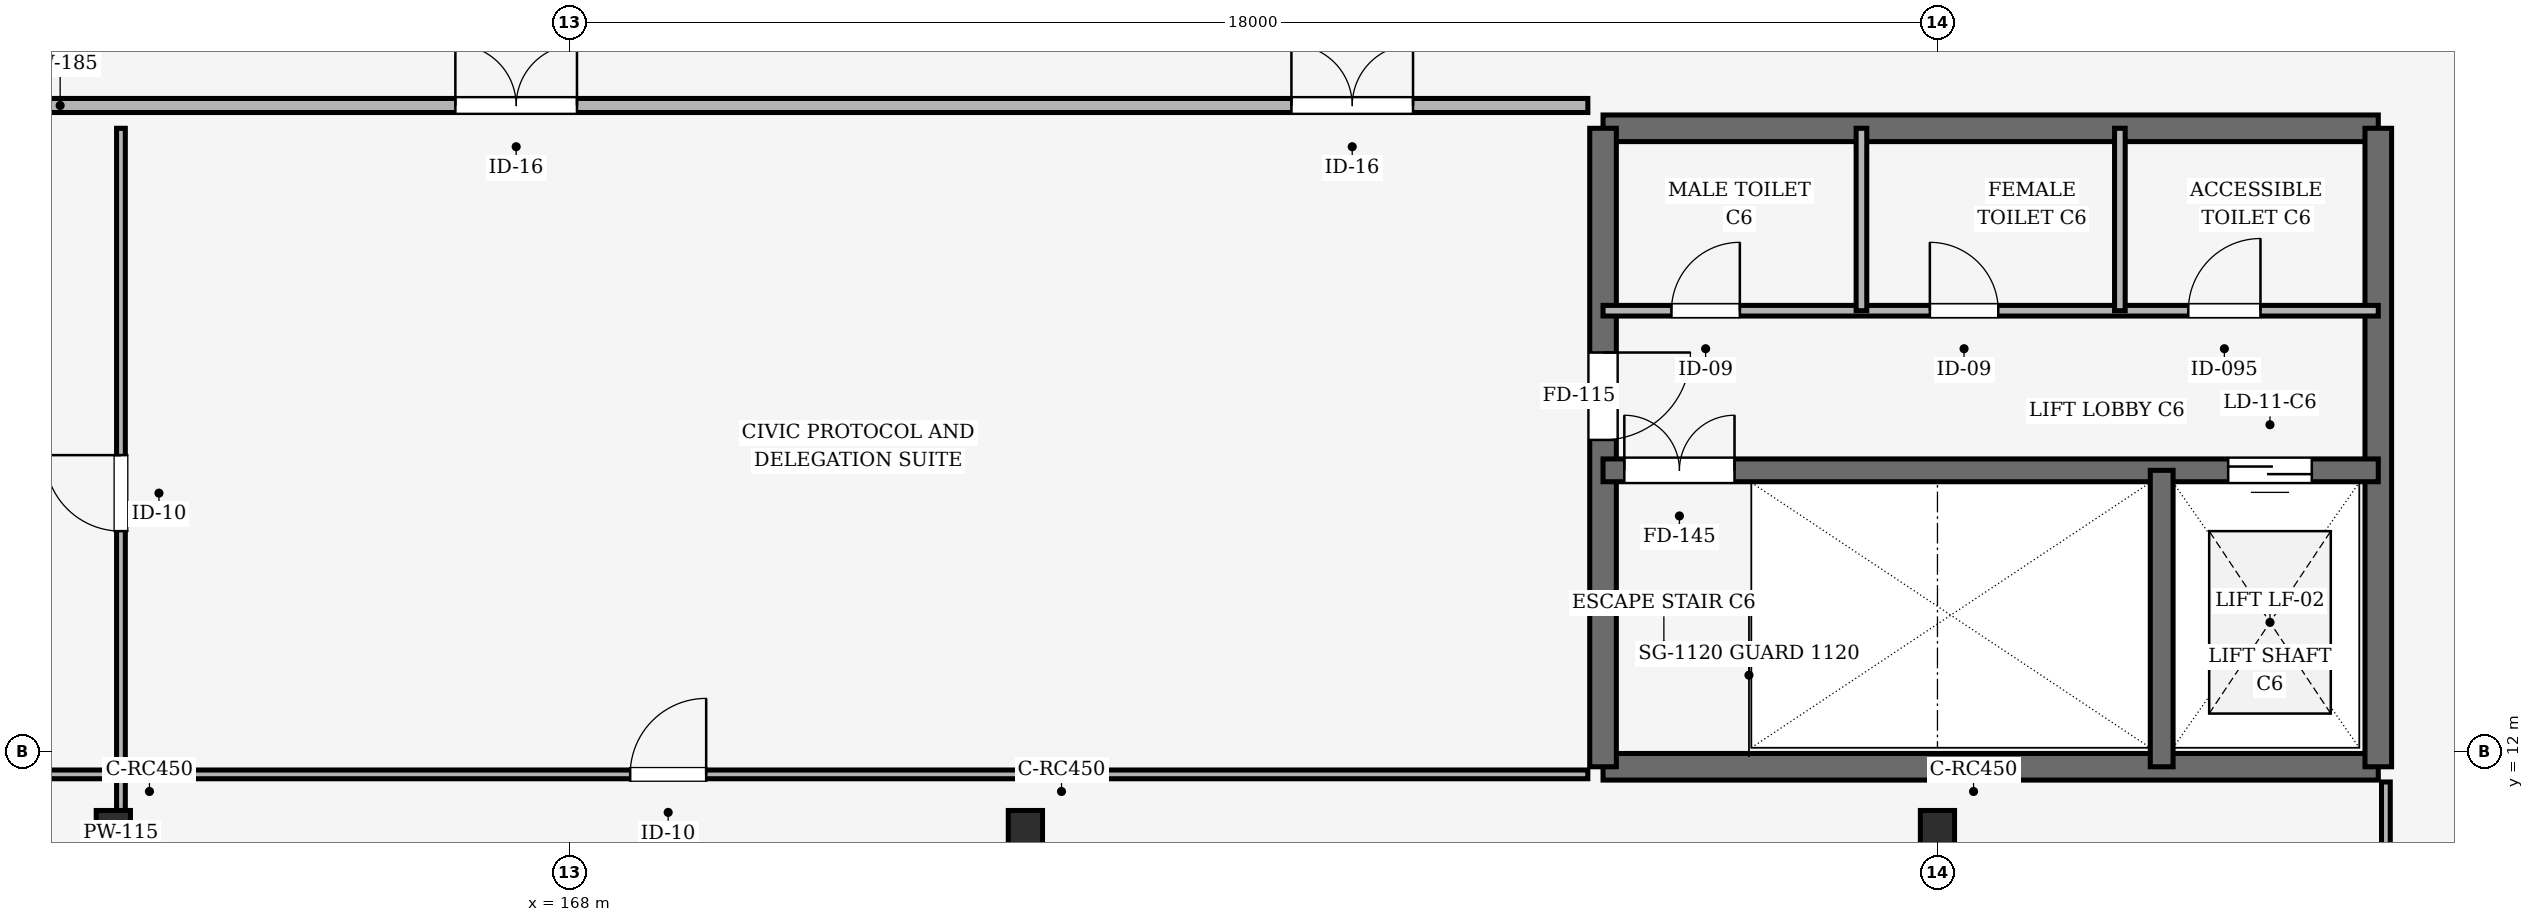
"""IFC4 building model, lengths in metres.
Left out: names, types, materials, properties, quantities, classifications, styles, units other than length and angle.
Written with IfcOpenShell. Run it as: python <this file> out.ifc"""

import sys

from ifc_helpers import new_model, si_unit, direction, frame, frame_2d, origin, origin_2d, place, context, subcontext, project, spatial, rectangle, extrude, element, fill, save


model = new_model("IFC4")
c1 = context("Model", 3, precision=1e-05, world=origin(), true_north=direction((0.0, 1.0)))
c2 = subcontext(c1, "Body", "Model", "MODEL_VIEW")
j1 = project(units=[si_unit("LENGTHUNIT", "METRE"), si_unit("PLANEANGLEUNIT", "RADIAN")], contexts=[c1])
p1 = place(None, origin())
s1 = spatial("IfcSite", under=j1, at=p1, CompositionType="ELEMENT")
p2 = place(p1, origin())
s2 = spatial("IfcBuilding", under=s1, at=p2, CompositionType="ELEMENT")
p3 = place(p2, frame((0.0, 0.0, 16.2)))
s3 = spatial("IfcBuildingStorey", under=s2, at=p3, CompositionType="ELEMENT", Elevation=16.2)
for number, where, z_axis, x_axis in (
    (1, (162.0, 11.0, 0.0), (0.0, 0.0, 1.0), (1.0, 0.0, 0.0)),
    (2, (174.0, 11.0, 0.0), (0.0, 0.0, 1.0), (1.0, 0.0, 0.0)),
    (3, (186.0, 11.0, 0.0), (0.0, 0.0, 1.0), (1.0, 0.0, 0.0)),
):
    element("IfcColumn", number, at=place(p3, frame(where, z_axis=z_axis, x_axis=x_axis)), inside=s3, PredefinedType="COLUMN", context=c2, shape_type="SweptSolid", body=[
        extrude(rectangle(XDim=0.45, YDim=0.45, at=origin_2d()), origin(), (0.0, 0.0, 1.0), 4.5),
    ])
for number, where, z_axis, x_axis in (
    (4, (181.6, 11.8, 0.0), (0.0, 0.0, 1.0), (1.0, 0.0, 0.0)),
    (5, (191.8, 20.2, 0.0), (0.0, 0.0, 1.0), (-1.0, 0.0, 0.0)),
):
    element("IfcWall", number, at=place(p3, frame(where, z_axis=z_axis, x_axis=x_axis)), inside=s3, PredefinedType="SHEAR", context=c2, shape_type="SweptSolid", body=[
        extrude(rectangle(XDim=10.2, YDim=0.35, at=frame_2d((5.1, 0.0))), origin(), (0.0, 0.0, 1.0), 4.5),
    ])
p4 = place(p3, frame((181.6, 20.2, 0.0), z_axis=(0.0, 0.0, 1.0), x_axis=(0.0, -1.0, 0.0)))
e6 = element("IfcWall", 6, at=p4, inside=s3, PredefinedType="SHEAR", context=c2, shape_type="SweptSolid", body=[
    extrude(rectangle(XDim=8.4, YDim=0.35, at=frame_2d((4.2, 0.0))), origin(), (0.0, 0.0, 1.0), 4.5),
])
p5 = place(p4, frame((2.95, 0.0, 0.0)))
e7 = element("IfcOpeningElement", 7, at=p5, cuts=e6, PredefinedType="OPENING", context=c2, shape_type="SweptSolid", body=[
    extrude(rectangle(XDim=1.15, YDim=2.15, at=frame_2d((0.575, 1.075))), frame((0.0, 0.185, 0.0), z_axis=(0.0, -1.0, 0.0), x_axis=(1.0, 0.0, 0.0)), (0.0, 0.0, 1.0), 0.37),
])
p6 = place(p3, frame((191.8, 11.8, 0.0), z_axis=(0.0, 0.0, 1.0), x_axis=(0.0, 1.0, 0.0)))
e8 = element("IfcWall", 8, at=p6, inside=s3, PredefinedType="SHEAR", context=c2, shape_type="SweptSolid", body=[
    extrude(rectangle(XDim=8.4, YDim=0.35, at=frame_2d((4.2, 0.0))), origin(), (0.0, 0.0, 1.0), 4.5),
])
p7 = place(p3, frame((181.6, 15.7, 0.0), z_axis=(0.0, 0.0, 1.0), x_axis=(1.0, 0.0, 0.0)))
e9 = element("IfcWall", 9, at=p7, inside=s3, PredefinedType="SHEAR", context=c2, shape_type="SweptSolid", body=[
    extrude(rectangle(XDim=10.2, YDim=0.3, at=frame_2d((5.1, 0.0))), origin(), (0.0, 0.0, 1.0), 4.5),
])
p8 = place(p7, frame((0.28, 0.0, 0.0)))
e10 = element("IfcOpeningElement", 10, at=p8, cuts=e9, PredefinedType="OPENING", context=c2, shape_type="SweptSolid", body=[
    extrude(rectangle(XDim=1.45, YDim=2.15, at=frame_2d((0.725, 1.075))), frame((0.0, 0.16, 0.0), z_axis=(0.0, -1.0, 0.0), x_axis=(1.0, 0.0, 0.0)), (0.0, 0.0, 1.0), 0.32),
])
p9 = place(p7, frame((8.225, 0.0, 0.0)))
e11 = element("IfcOpeningElement", 11, at=p9, cuts=e9, PredefinedType="OPENING", context=c2, shape_type="SweptSolid", body=[
    extrude(rectangle(XDim=1.1, YDim=2.15, at=frame_2d((0.55, 1.075))), frame((0.0, 0.16, 0.0), z_axis=(0.0, -1.0, 0.0), x_axis=(1.0, 0.0, 0.0)), (0.0, 0.0, 1.0), 0.32),
])
p10 = place(p3, frame((188.95, 11.8, 0.0), z_axis=(0.0, 0.0, 1.0), x_axis=(0.0, 1.0, 0.0)))
e12 = element("IfcWall", 12, at=p10, inside=s3, PredefinedType="SHEAR", context=c2, shape_type="SweptSolid", body=[
    extrude(rectangle(XDim=3.9, YDim=0.3, at=frame_2d((1.95, 0.0))), origin(), (0.0, 0.0, 1.0), 4.5),
])
p11 = place(p3, frame((181.6, 17.8, 0.0), z_axis=(0.0, 0.0, 1.0), x_axis=(1.0, 0.0, 0.0)))
e13 = element("IfcWall", 13, at=p11, inside=s3, PredefinedType="PARTITIONING", context=c2, shape_type="SweptSolid", body=[
    extrude(rectangle(XDim=10.2, YDim=0.14, at=frame_2d((5.1, 0.0))), origin(), (0.0, 0.0, 1.0), 3.565),
])
p12 = place(p11, frame((0.9, 0.0, 0.0)))
e14 = element("IfcOpeningElement", 14, at=p12, cuts=e13, PredefinedType="OPENING", context=c2, shape_type="SweptSolid", body=[
    extrude(rectangle(XDim=0.9, YDim=2.1, at=frame_2d((0.45, 1.05))), frame((0.0, 0.08, 0.0), z_axis=(0.0, -1.0, 0.0), x_axis=(1.0, 0.0, 0.0)), (0.0, 0.0, 1.0), 0.16),
])
p13 = place(p11, frame((4.3, 0.0, 0.0)))
e15 = element("IfcOpeningElement", 15, at=p13, cuts=e13, PredefinedType="OPENING", context=c2, shape_type="SweptSolid", body=[
    extrude(rectangle(XDim=0.9, YDim=2.1, at=frame_2d((0.45, 1.05))), frame((0.0, 0.08, 0.0), z_axis=(0.0, -1.0, 0.0), x_axis=(1.0, 0.0, 0.0)), (0.0, 0.0, 1.0), 0.16),
])
p14 = place(p11, frame((7.7, 0.0, 0.0)))
e16 = element("IfcOpeningElement", 16, at=p14, cuts=e13, PredefinedType="OPENING", context=c2, shape_type="SweptSolid", body=[
    extrude(rectangle(XDim=0.95, YDim=2.1, at=frame_2d((0.475, 1.05))), frame((0.0, 0.08, 0.0), z_axis=(0.0, -1.0, 0.0), x_axis=(1.0, 0.0, 0.0)), (0.0, 0.0, 1.0), 0.16),
])
for number, where, z_axis, x_axis in (
    (17, (185.0, 17.8, 0.0), (0.0, 0.0, 1.0), (0.0, 1.0, 0.0)),
    (18, (188.4, 17.8, 0.0), (0.0, 0.0, 1.0), (0.0, 1.0, 0.0)),
):
    element("IfcWall", number, at=place(p3, frame(where, z_axis=z_axis, x_axis=x_axis)), inside=s3, PredefinedType="PARTITIONING", context=c2, shape_type="SweptSolid", body=[
        extrude(rectangle(XDim=2.4, YDim=0.14, at=frame_2d((1.2, 0.0))), origin(), (0.0, 0.0, 1.0), 3.6),
    ])
p15 = place(p3, frame((137.8, 20.5, 0.0), z_axis=(0.0, 0.0, 1.0), x_axis=(1.0, 0.0, 0.0)))
e19 = element("IfcWall", 19, at=p15, inside=s3, PredefinedType="PARTITIONING", context=c2, shape_type="SweptSolid", body=[
    extrude(rectangle(XDim=43.6, YDim=0.185, at=frame_2d((21.8, 0.0))), origin(), (0.0, 0.0, 1.0), 3.565),
])
p16 = place(p15, frame((5.7, 0.0, 0.0)))
e20 = element("IfcOpeningElement", 20, at=p16, cuts=e19, PredefinedType="OPENING", context=c2, shape_type="SweptSolid", body=[
    extrude(rectangle(XDim=1.6, YDim=2.2, at=frame_2d((0.8, 1.1))), frame((0.0, 0.103, 0.0), z_axis=(0.0, -1.0, 0.0), x_axis=(1.0, 0.0, 0.0)), (0.0, 0.0, 1.0), 0.205),
])
p17 = place(p15, frame((28.7, 0.0, 0.0)))
e21 = element("IfcOpeningElement", 21, at=p17, cuts=e19, PredefinedType="OPENING", context=c2, shape_type="SweptSolid", body=[
    extrude(rectangle(XDim=1.6, YDim=2.2, at=frame_2d((0.8, 1.1))), frame((0.0, 0.103, 0.0), z_axis=(0.0, -1.0, 0.0), x_axis=(1.0, 0.0, 0.0)), (0.0, 0.0, 1.0), 0.205),
])
p18 = place(p15, frame((39.7, 0.0, 0.0)))
e22 = element("IfcOpeningElement", 22, at=p18, cuts=e19, PredefinedType="OPENING", context=c2, shape_type="SweptSolid", body=[
    extrude(rectangle(XDim=1.6, YDim=2.2, at=frame_2d((0.8, 1.1))), frame((0.0, 0.103, 0.0), z_axis=(0.0, -1.0, 0.0), x_axis=(1.0, 0.0, 0.0)), (0.0, 0.0, 1.0), 0.205),
])
p19 = place(p15, frame((16.7, 0.0, 0.0)))
e23 = element("IfcOpeningElement", 23, at=p19, cuts=e19, PredefinedType="OPENING", context=c2, shape_type="SweptSolid", body=[
    extrude(rectangle(XDim=1.6, YDim=2.2, at=frame_2d((0.8, 1.1))), frame((0.0, 0.103, 0.0), z_axis=(0.0, -1.0, 0.0), x_axis=(1.0, 0.0, 0.0)), (0.0, 0.0, 1.0), 0.205),
])
p20 = place(p3, frame((162.1, 0.4, 0.0), z_axis=(0.0, 0.0, 1.0), x_axis=(0.0, 1.0, 0.0)))
e24 = element("IfcWall", 24, at=p20, inside=s3, PredefinedType="PARTITIONING", context=c2, shape_type="SweptSolid", body=[
    extrude(rectangle(XDim=19.8, YDim=0.115, at=frame_2d((9.9, 0.0))), origin(), (0.0, 0.0, 1.0), 3.565),
])
p21 = place(p20, frame((5.0, 0.0, 0.0)))
e25 = element("IfcOpeningElement", 25, at=p21, cuts=e24, PredefinedType="OPENING", context=c2, shape_type="SweptSolid", body=[
    extrude(rectangle(XDim=1.0, YDim=2.15, at=frame_2d((0.5, 1.075))), frame((0.0, 0.067, 0.0), z_axis=(0.0, -1.0, 0.0), x_axis=(1.0, 0.0, 0.0)), (0.0, 0.0, 1.0), 0.135),
])
p22 = place(p20, frame((14.5, 0.0, 0.0)))
e26 = element("IfcOpeningElement", 26, at=p22, cuts=e24, PredefinedType="OPENING", context=c2, shape_type="SweptSolid", body=[
    extrude(rectangle(XDim=1.0, YDim=2.15, at=frame_2d((0.5, 1.075))), frame((0.0, 0.067, 0.0), z_axis=(0.0, -1.0, 0.0), x_axis=(1.0, 0.0, 0.0)), (0.0, 0.0, 1.0), 0.135),
])
p23 = place(p3, frame((137.8, 11.7, 0.0), z_axis=(0.0, 0.0, 1.0), x_axis=(1.0, 0.0, 0.0)))
e27 = element("IfcWall", 27, at=p23, inside=s3, PredefinedType="PARTITIONING", context=c2, shape_type="SweptSolid", body=[
    extrude(rectangle(XDim=43.6, YDim=0.115, at=frame_2d((21.8, 0.0))), origin(), (0.0, 0.0, 1.0), 3.565),
])
p24 = place(p23, frame((10.0, 0.0, 0.0)))
e28 = element("IfcOpeningElement", 28, at=p24, cuts=e27, PredefinedType="OPENING", context=c2, shape_type="SweptSolid", body=[
    extrude(rectangle(XDim=1.0, YDim=2.15, at=frame_2d((0.5, 1.075))), frame((0.0, 0.067, 0.0), z_axis=(0.0, -1.0, 0.0), x_axis=(1.0, 0.0, 0.0)), (0.0, 0.0, 1.0), 0.135),
])
p25 = place(p23, frame((31.0, 0.0, 0.0)))
e29 = element("IfcOpeningElement", 29, at=p25, cuts=e27, PredefinedType="OPENING", context=c2, shape_type="SweptSolid", body=[
    extrude(rectangle(XDim=1.0, YDim=2.15, at=frame_2d((0.5, 1.075))), frame((0.0, 0.067, 0.0), z_axis=(0.0, -1.0, 0.0), x_axis=(1.0, 0.0, 0.0)), (0.0, 0.0, 1.0), 0.135),
])
p26 = place(p3, frame((191.9, 0.4, 0.0), z_axis=(0.0, 0.0, 1.0), x_axis=(0.0, 1.0, 0.0)))
e30 = element("IfcWall", 30, at=p26, inside=s3, PredefinedType="PARTITIONING", context=c2, shape_type="SweptSolid", body=[
    extrude(rectangle(XDim=11.2, YDim=0.115, at=frame_2d((5.6, 0.0))), origin(), (0.0, 0.0, 1.0), 3.565),
])
p27 = place(p26, frame((5.0, 0.0, 0.0)))
e31 = element("IfcOpeningElement", 31, at=p27, cuts=e30, PredefinedType="OPENING", context=c2, shape_type="SweptSolid", body=[
    extrude(rectangle(XDim=1.0, YDim=2.15, at=frame_2d((0.5, 1.075))), frame((0.0, 0.067, 0.0), z_axis=(0.0, -1.0, 0.0), x_axis=(1.0, 0.0, 0.0)), (0.0, 0.0, 1.0), 0.135),
])
p28 = place(p5, origin())
e32 = element("IfcDoor", 32, at=p28, inside=s3, OperationType="SINGLE_SWING_LEFT", PredefinedType="DOOR", context=c2, shape_type="SweptSolid", body=[
    extrude(rectangle(XDim=1.15, YDim=2.15, at=frame_2d((0.575, 1.075))), frame((0.0, 0.025, 0.0), z_axis=(0.0, -1.0, 0.0), x_axis=(1.0, 0.0, 0.0)), (0.0, 0.0, 1.0), 0.05),
])
fill(e7, e32)
p29 = place(p8, origin())
e33 = element("IfcDoor", 33, at=p29, inside=s3, OperationType="DOUBLE_DOOR_SINGLE_SWING", PredefinedType="DOOR", context=c2, shape_type="SweptSolid", body=[
    extrude(rectangle(XDim=1.45, YDim=2.15, at=frame_2d((0.725, 1.075))), frame((0.0, 0.025, 0.0), z_axis=(0.0, -1.0, 0.0), x_axis=(1.0, 0.0, 0.0)), (0.0, 0.0, 1.0), 0.05),
])
fill(e10, e33)
p30 = place(p9, origin())
e34 = element("IfcDoor", 34, at=p30, inside=s3, OperationType="DOUBLE_DOOR_SLIDING", PredefinedType="DOOR", context=c2, shape_type="SweptSolid", body=[
    extrude(rectangle(XDim=1.1, YDim=2.15, at=frame_2d((0.55, 1.075))), frame((0.0, 0.025, 0.0), z_axis=(0.0, -1.0, 0.0), x_axis=(1.0, 0.0, 0.0)), (0.0, 0.0, 1.0), 0.05),
])
fill(e11, e34)
p31 = place(p12, origin())
e35 = element("IfcDoor", 35, at=p31, inside=s3, OperationType="SINGLE_SWING_RIGHT", PredefinedType="DOOR", context=c2, shape_type="SweptSolid", body=[
    extrude(rectangle(XDim=0.9, YDim=2.1, at=frame_2d((0.45, 1.05))), frame((0.0, 0.025, 0.0), z_axis=(0.0, -1.0, 0.0), x_axis=(1.0, 0.0, 0.0)), (0.0, 0.0, 1.0), 0.05),
])
fill(e14, e35)
p32 = place(p13, origin())
e36 = element("IfcDoor", 36, at=p32, inside=s3, OperationType="SINGLE_SWING_LEFT", PredefinedType="DOOR", context=c2, shape_type="SweptSolid", body=[
    extrude(rectangle(XDim=0.9, YDim=2.1, at=frame_2d((0.45, 1.05))), frame((0.0, 0.025, 0.0), z_axis=(0.0, -1.0, 0.0), x_axis=(1.0, 0.0, 0.0)), (0.0, 0.0, 1.0), 0.05),
])
fill(e15, e36)
p33 = place(p14, origin())
e37 = element("IfcDoor", 37, at=p33, inside=s3, OperationType="SINGLE_SWING_RIGHT", PredefinedType="DOOR", context=c2, shape_type="SweptSolid", body=[
    extrude(rectangle(XDim=0.95, YDim=2.1, at=frame_2d((0.475, 1.05))), frame((0.0, 0.025, 0.0), z_axis=(0.0, -1.0, 0.0), x_axis=(1.0, 0.0, 0.0)), (0.0, 0.0, 1.0), 0.05),
])
fill(e16, e37)
p34 = place(p17, origin())
e38 = element("IfcDoor", 38, at=p34, inside=s3, OperationType="DOUBLE_DOOR_SINGLE_SWING", PredefinedType="DOOR", context=c2, shape_type="SweptSolid", body=[
    extrude(rectangle(XDim=1.6, YDim=2.2, at=frame_2d((0.8, 1.1))), frame((0.0, 0.025, 0.0), z_axis=(0.0, -1.0, 0.0), x_axis=(1.0, 0.0, 0.0)), (0.0, 0.0, 1.0), 0.05),
])
fill(e21, e38)
p35 = place(p18, origin())
e39 = element("IfcDoor", 39, at=p35, inside=s3, OperationType="DOUBLE_DOOR_SINGLE_SWING", PredefinedType="DOOR", context=c2, shape_type="SweptSolid", body=[
    extrude(rectangle(XDim=1.6, YDim=2.2, at=frame_2d((0.8, 1.1))), frame((0.0, 0.025, 0.0), z_axis=(0.0, -1.0, 0.0), x_axis=(1.0, 0.0, 0.0)), (0.0, 0.0, 1.0), 0.05),
])
fill(e22, e39)
p36 = place(p22, origin())
e40 = element("IfcDoor", 40, at=p36, inside=s3, OperationType="SINGLE_SWING_RIGHT", PredefinedType="DOOR", context=c2, shape_type="SweptSolid", body=[
    extrude(rectangle(XDim=1.0, YDim=2.15, at=frame_2d((0.5, 1.075))), frame((0.0, 0.025, 0.0), z_axis=(0.0, -1.0, 0.0), x_axis=(1.0, 0.0, 0.0)), (0.0, 0.0, 1.0), 0.05),
])
fill(e26, e40)
p37 = place(p25, origin())
e41 = element("IfcDoor", 41, at=p37, inside=s3, OperationType="SINGLE_SWING_RIGHT", PredefinedType="DOOR", context=c2, shape_type="SweptSolid", body=[
    extrude(rectangle(XDim=1.0, YDim=2.15, at=frame_2d((0.5, 1.075))), frame((0.0, 0.025, 0.0), z_axis=(0.0, -1.0, 0.0), x_axis=(1.0, 0.0, 0.0)), (0.0, 0.0, 1.0), 0.05),
])
fill(e29, e41)
save(model, sys.argv[1])
